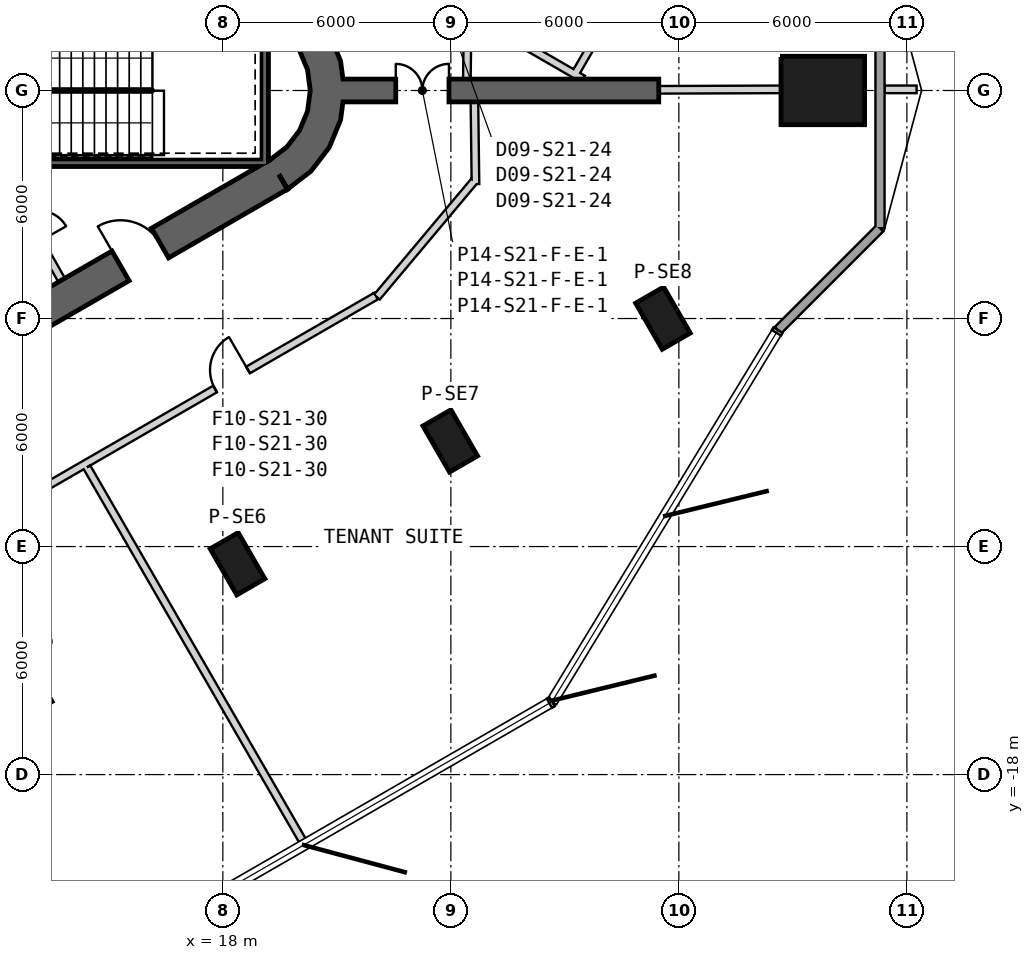
"""IFC4 building model, lengths in metres.
Left out: names, types, materials, properties, quantities, classifications, styles, units other than length and angle.
Written with IfcOpenShell. Run it as: python <this file> out.ifc"""

import sys

from ifc_helpers import new_model, si_unit, direction, frame, frame_2d, origin, origin_2d, place, context, subcontext, project, spatial, polyline, rectangle, outline, extrude, element, fill, save


model = new_model("IFC4")
c1 = context("Model", 3, precision=1e-05, world=origin(), true_north=direction((0.0, 1.0)))
c2 = subcontext(c1, "Body", "Model", "MODEL_VIEW")
j1 = project(units=[si_unit("LENGTHUNIT", "METRE"), si_unit("PLANEANGLEUNIT", "RADIAN")], contexts=[c1])
p1 = place(None, origin())
s1 = spatial("IfcSite", under=j1, at=p1, CompositionType="ELEMENT")
p2 = place(p1, origin())
s2 = spatial("IfcBuilding", under=s1, at=p2, CompositionType="ELEMENT")
p3 = place(p2, frame((0.0, 0.0, 333.8)))
s3 = spatial("IfcBuildingStorey", under=s2, at=p3, CompositionType="ELEMENT", Elevation=333.8)
p4 = place(p3, frame((33.787, 0.0, 0.0), z_axis=(0.0, 0.0, 1.0), x_axis=(1.0, 0.0, 0.0)))
e1 = element("IfcColumn", 1, at=p4, inside=s3, PredefinedType="COLUMN", context=c2, shape_type="SweptSolid", body=[
    extrude(rectangle(XDim=2.2, YDim=1.8, at=origin_2d()), origin(), (0.0, 0.0, 1.0), 3.9),
])
for number, where, z_axis, x_axis in (
    (2, (18.386, -12.453, 0.0), (0.0, 0.0, 1.0), (0.5, -0.866, 0.0)),
    (3, (23.984, -9.221, 0.0), (0.0, 0.0, 1.0), (0.5, -0.866, 0.0)),
    (4, (29.582, -5.99, 0.0), (0.0, 0.0, 1.0), (0.5, -0.866, 0.0)),
):
    element("IfcColumn", number, at=place(p3, frame(where, z_axis=z_axis, x_axis=x_axis)), inside=s3, PredefinedType="COLUMN", context=c2, shape_type="SweptSolid", body=[
        extrude(rectangle(XDim=1.4, YDim=0.85, at=origin_2d()), origin(), (0.0, 0.0, 1.0), 3.9),
    ])
p5 = place(p3, frame((-7.825, -17.97, 0.0), z_axis=(0.0, 0.0, 1.0), x_axis=(0.866028369851, 0.499994862586, 0.0)))
e5 = element("IfcWall", 5, at=p5, inside=s3, PredefinedType="SHEAR", context=c2, shape_type="SweptSolid", body=[
    extrude(rectangle(XDim=31.523, YDim=0.9, at=frame_2d((15.762, 0.0))), origin(), (0.0, 0.0, 1.0), 3.9),
])
p6 = place(p5, frame((17.862, 0.0, 0.0)))
e6 = element("IfcOpeningElement", 6, at=p6, cuts=e5, PredefinedType="OPENING", context=c2, shape_type="SweptSolid", body=[
    extrude(rectangle(XDim=1.2, YDim=2.4, at=frame_2d((0.6, 1.2))), frame((0.0, 0.46, 0.0), z_axis=(0.0, -1.0, 0.0), x_axis=(1.0, 0.0, 0.0)), (0.0, 0.0, 1.0), 0.92),
])
p7 = place(p5, frame((20.562, 0.0, 0.0)))
e7 = element("IfcOpeningElement", 7, at=p7, cuts=e5, PredefinedType="OPENING", context=c2, shape_type="SweptSolid", body=[
    extrude(rectangle(XDim=1.2, YDim=2.4, at=frame_2d((0.6, 1.2))), frame((0.0, 0.46, 0.0), z_axis=(0.0, -1.0, 0.0), x_axis=(1.0, 0.0, 0.0)), (0.0, 0.0, 1.0), 0.92),
])
p8 = place(p5, frame((26.712, 0.0, 0.0)))
e8 = element("IfcOpeningElement", 8, at=p8, cuts=e5, PredefinedType="OPENING", context=c2, shape_type="SweptSolid", body=[
    extrude(rectangle(XDim=1.2, YDim=2.4, at=frame_2d((0.6, 1.2))), frame((0.0, 0.46, 0.0), z_axis=(0.0, -1.0, 0.0), x_axis=(1.0, 0.0, 0.0)), (0.0, 0.0, 1.0), 0.92),
])
p9 = place(p5, frame((3.612, 0.0, 0.0)))
e9 = element("IfcOpeningElement", 9, at=p9, cuts=e5, PredefinedType="OPENING", context=c2, shape_type="SweptSolid", body=[
    extrude(rectangle(XDim=1.2, YDim=2.4, at=frame_2d((0.6, 1.2))), frame((0.0, 0.46, 0.0), z_axis=(0.0, -1.0, 0.0), x_axis=(1.0, 0.0, 0.0)), (0.0, 0.0, 1.0), 0.92),
])
p10 = place(p3, origin())
e10 = element("IfcWall", 10, at=p10, inside=s3, PredefinedType="SHEAR", context=c2, shape_type="SweptSolid", body=[
    extrude(outline(polyline([(19.7, -2.598), (20.321, -2.121), (20.798, -1.5), (21.098, -0.777), (21.2, 0.0), (21.098, 0.777), (20.798, 1.5), (20.321, 2.121), (19.7, 2.598), (19.25, 1.819), (19.685, 1.485), (20.019, 1.05), (20.229, 0.543), (20.3, 0.0), (20.229, -0.543), (20.019, -1.05), (19.685, -1.485), (19.25, -1.819), (19.7, -2.598)])), origin(), (0.0, 0.0, 1.0), 3.9),
])
p11 = place(p3, frame((21.15, 0.0, 0.0), z_axis=(0.0, 0.0, 1.0), x_axis=(1.0, 0.0, 0.0)))
e11 = element("IfcWall", 11, at=p11, inside=s3, PredefinedType="SHEAR", context=c2, shape_type="SweptSolid", body=[
    extrude(rectangle(XDim=8.321, YDim=0.6, at=frame_2d((4.16, 0.0))), origin(), (0.0, 0.0, 1.0), 3.9),
])
p12 = place(p11, frame((1.4, 0.0, 0.0)))
e12 = element("IfcOpeningElement", 12, at=p12, cuts=e11, PredefinedType="OPENING", context=c2, shape_type="SweptSolid", body=[
    extrude(rectangle(XDim=1.4, YDim=2.4, at=frame_2d((0.7, 1.2))), frame((0.0, 0.31, 0.0), z_axis=(0.0, -1.0, 0.0), x_axis=(1.0, 0.0, 0.0)), (0.0, 0.0, 1.0), 0.62),
])
p13 = place(p3, frame((32.608, -6.306, 0.0), z_axis=(0.0, 0.0, 1.0), x_axis=(0.707138934827, 0.707074626084, 0.0)))
e13 = element("IfcWall", 13, at=p13, inside=s3, PredefinedType="SOLIDWALL", context=c2, shape_type="SweptSolid", body=[
    extrude(rectangle(XDim=3.796, YDim=0.24, at=frame_2d((1.898, 0.0))), origin(), (0.0, 0.0, 1.0), 3.6),
])
p14 = place(p3, frame((35.292, -3.622, 0.0), z_axis=(0.0, 0.0, 1.0), x_axis=(0.0, 1.0, 0.0)))
e14 = element("IfcWall", 14, at=p14, inside=s3, PredefinedType="SOLIDWALL", context=c2, shape_type="SweptSolid", body=[
    extrude(rectangle(XDim=7.244, YDim=0.24, at=frame_2d((3.622, 0.0))), origin(), (0.0, 0.0, 1.0), 3.6),
])
p15 = place(p3, frame((19.1, -2.0, -0.3), z_axis=(0.0, 0.0, 1.0), x_axis=(0.0, 1.0, 0.0)))
e15 = element("IfcWall", 15, at=p15, inside=s3, PredefinedType="SHEAR", context=c2, shape_type="SweptSolid", body=[
    extrude(rectangle(XDim=3.8, YDim=0.2, at=frame_2d((1.9, 0.0))), origin(), (0.0, 0.0, 1.0), 3.9),
])
p16 = place(p3, frame((11.1, -1.9, -0.3), z_axis=(0.0, 0.0, 1.0), x_axis=(1.0, 0.0, 0.0)))
e16 = element("IfcWall", 16, at=p16, inside=s3, PredefinedType="SHEAR", context=c2, shape_type="SweptSolid", body=[
    extrude(rectangle(XDim=7.9, YDim=0.2, at=frame_2d((3.95, 0.0))), origin(), (0.0, 0.0, 1.0), 3.9),
])
p17 = place(p3, frame((13.758, -4.99, 0.0), z_axis=(0.0, 0.0, 1.0), x_axis=(-0.491993409184, 0.87059892334, 0.0)))
e17 = element("IfcWall", 17, at=p17, inside=s3, PredefinedType="PARTITIONING", context=c2, shape_type="SweptSolid", body=[
    extrude(rectangle(XDim=3.15, YDim=0.2, at=frame_2d((1.575, 0.0))), origin(), (0.0, 0.0, 1.0), 3.6),
])
p18 = place(p17, frame((1.175, 0.0, 0.0)))
e18 = element("IfcOpeningElement", 18, at=p18, cuts=e17, PredefinedType="OPENING", context=c2, shape_type="SweptSolid", body=[
    extrude(rectangle(XDim=0.8, YDim=2.1, at=frame_2d((0.4, 1.05))), frame((0.0, 0.11, 0.0), z_axis=(0.0, -1.0, 0.0), x_axis=(1.0, 0.0, 0.0)), (0.0, 0.0, 1.0), 0.22),
])
p19 = place(p3, frame((24.421, 0.3, 0.0), z_axis=(0.0, 0.0, 1.0), x_axis=(0.014331902383, 0.999897293013, 0.0)))
e19 = element("IfcWall", 19, at=p19, inside=s3, PredefinedType="PARTITIONING", context=c2, shape_type="SweptSolid", body=[
    extrude(rectangle(XDim=1.976, YDim=0.2, at=frame_2d((0.988, 0.0))), origin(), (0.0, 0.0, 1.0), 3.6),
])
p20 = place(p3, frame((24.648, -2.462, 0.0), z_axis=(0.0, 0.0, 1.0), x_axis=(-0.012757232068, 0.999918623204, 0.0)))
e20 = element("IfcWall", 20, at=p20, inside=s3, PredefinedType="PARTITIONING", context=c2, shape_type="SweptSolid", body=[
    extrude(rectangle(XDim=2.163, YDim=0.2, at=frame_2d((1.081, 0.0))), origin(), (0.0, 0.0, 1.0), 3.6),
])
p21 = place(p3, frame((22.054, -5.435, 0.0), z_axis=(0.0, 0.0, 1.0), x_axis=(0.642790979996, 0.766041615081, 0.0)))
e21 = element("IfcWall", 21, at=p21, inside=s3, PredefinedType="PARTITIONING", context=c2, shape_type="SweptSolid", body=[
    extrude(rectangle(XDim=3.983, YDim=0.2, at=frame_2d((1.992, 0.0))), origin(), (0.0, 0.0, 1.0), 2.88),
])
p22 = place(p3, frame((-6.505, -21.885, 0.0), z_axis=(0.0, 0.0, 1.0), x_axis=(0.86602457258, 0.500001439686, 0.0)))
e22 = element("IfcWall", 22, at=p22, inside=s3, PredefinedType="PARTITIONING", context=c2, shape_type="SweptSolid", body=[
    extrude(rectangle(XDim=32.952, YDim=0.2, at=frame_2d((16.476, 0.0))), origin(), (0.0, 0.0, 1.0), 2.97),
])
p23 = place(p22, frame((28.061, 0.0, 0.0)))
e23 = element("IfcOpeningElement", 23, at=p23, cuts=e22, PredefinedType="OPENING", context=c2, shape_type="SweptSolid", body=[
    extrude(rectangle(XDim=1.0, YDim=2.1, at=frame_2d((0.5, 1.05))), frame((0.0, 0.11, 0.0), z_axis=(0.0, -1.0, 0.0), x_axis=(1.0, 0.0, 0.0)), (0.0, 0.0, 1.0), 0.22),
])
p24 = place(p22, frame((16.137, 0.0, 0.0)))
e24 = element("IfcOpeningElement", 24, at=p24, cuts=e22, PredefinedType="OPENING", context=c2, shape_type="SweptSolid", body=[
    extrude(rectangle(XDim=1.0, YDim=2.1, at=frame_2d((0.5, 1.05))), frame((0.0, 0.11, 0.0), z_axis=(0.0, -1.0, 0.0), x_axis=(1.0, 0.0, 0.0)), (0.0, 0.0, 1.0), 0.22),
])
p25 = place(p22, frame((4.101, 0.0, 0.0)))
e25 = element("IfcOpeningElement", 25, at=p25, cuts=e22, PredefinedType="OPENING", context=c2, shape_type="SweptSolid", body=[
    extrude(rectangle(XDim=1.0, YDim=2.1, at=frame_2d((0.5, 1.05))), frame((0.0, 0.11, 0.0), z_axis=(0.0, -1.0, 0.0), x_axis=(1.0, 0.0, 0.0)), (0.0, 0.0, 1.0), 0.22),
])
p26 = place(p3, frame((35.412, 0.03, 0.0), z_axis=(0.0, 0.0, 1.0), x_axis=(1.0, 0.0, 0.0)))
e26 = element("IfcWall", 26, at=p26, inside=s3, PredefinedType="PARTITIONING", context=c2, shape_type="SweptSolid", body=[
    extrude(rectangle(XDim=0.843, YDim=0.2, at=frame_2d((0.421, 0.0))), origin(), (0.0, 0.0, 1.0), 3.6),
])
p27 = place(p3, frame((29.471, 0.018, 0.0), z_axis=(0.0, 0.0, 1.0), x_axis=(0.999993083977, 0.003719139364, 0.0)))
e27 = element("IfcWall", 27, at=p27, inside=s3, PredefinedType="PARTITIONING", context=c2, shape_type="SweptSolid", body=[
    extrude(rectangle(XDim=3.217, YDim=0.2, at=frame_2d((1.608, 0.0))), origin(), (0.0, 0.0, 1.0), 3.17),
])
p28 = place(p3, frame((24.545, 1.995, 0.0), z_axis=(0.0, 0.0, 1.0), x_axis=(0.866027263711, -0.4999967785, 0.0)))
e28 = element("IfcWall", 28, at=p28, inside=s3, PredefinedType="PARTITIONING", context=c2, shape_type="SweptSolid", body=[
    extrude(rectangle(XDim=3.39, YDim=0.2, at=frame_2d((1.695, 0.0))), origin(), (0.0, 0.0, 1.0), 3.6),
])
p29 = place(p3, frame((27.315, 0.511, 0.0), z_axis=(0.0, 0.0, 1.0), x_axis=(0.499996585558, 0.866027375104, 0.0)))
e29 = element("IfcWall", 29, at=p29, inside=s3, PredefinedType="PARTITIONING", context=c2, shape_type="SweptSolid", body=[
    extrude(rectangle(XDim=6.63, YDim=0.2, at=frame_2d((3.315, 0.0))), origin(), (0.0, 0.0, 1.0), 3.6),
])
p30 = place(p29, frame((2.765, 0.0, 0.0)))
e30 = element("IfcOpeningElement", 30, at=p30, cuts=e29, PredefinedType="OPENING", context=c2, shape_type="SweptSolid", body=[
    extrude(rectangle(XDim=1.0, YDim=2.1, at=frame_2d((0.5, 1.05))), frame((0.0, 0.11, 0.0), z_axis=(0.0, -1.0, 0.0), x_axis=(1.0, 0.0, 0.0)), (0.0, 0.0, 1.0), 0.22),
])
p31 = place(p3, frame((14.425, -9.916, 0.0), z_axis=(0.0, 0.0, 1.0), x_axis=(0.499943167381, -0.866058213626, 0.0)))
e31 = element("IfcWall", 31, at=p31, inside=s3, PredefinedType="PARTITIONING", context=c2, shape_type="SweptSolid", body=[
    extrude(rectangle(XDim=11.458, YDim=0.2, at=frame_2d((5.729, 0.0))), origin(), (0.0, 0.0, 1.0), 3.07),
])
p32 = place(p23, origin())
e32 = element("IfcDoor", 32, at=p32, inside=s3, OperationType="SINGLE_SWING_RIGHT", PredefinedType="USERDEFINED", context=c2, shape_type="SweptSolid", body=[
    extrude(rectangle(XDim=1.0, YDim=2.1, at=frame_2d((0.5, 1.05))), frame((0.0, 0.025, 0.0), z_axis=(0.0, -1.0, 0.0), x_axis=(1.0, 0.0, 0.0)), (0.0, 0.0, 1.0), 0.05),
])
fill(e23, e32)
p33 = place(p8, origin())
e33 = element("IfcDoor", 33, at=p33, inside=s3, OperationType="SINGLE_SWING_RIGHT", PredefinedType="USERDEFINED", context=c2, shape_type="SweptSolid", body=[
    extrude(rectangle(XDim=1.2, YDim=2.4, at=frame_2d((0.6, 1.2))), frame((0.0, 0.025, 0.0), z_axis=(0.0, -1.0, 0.0), x_axis=(1.0, 0.0, 0.0)), (0.0, 0.0, 1.0), 0.05),
])
fill(e8, e33)
p34 = place(p12, origin())
e34 = element("IfcDoor", 34, at=p34, inside=s3, OperationType="DOUBLE_DOOR_SINGLE_SWING", PredefinedType="NOTDEFINED", context=c2, shape_type="SweptSolid", body=[
    extrude(rectangle(XDim=1.4, YDim=2.4, at=frame_2d((0.7, 1.2))), frame((0.0, 0.025, 0.0), z_axis=(0.0, -1.0, 0.0), x_axis=(1.0, 0.0, 0.0)), (0.0, 0.0, 1.0), 0.05),
])
fill(e12, e34)
save(model, sys.argv[1])
